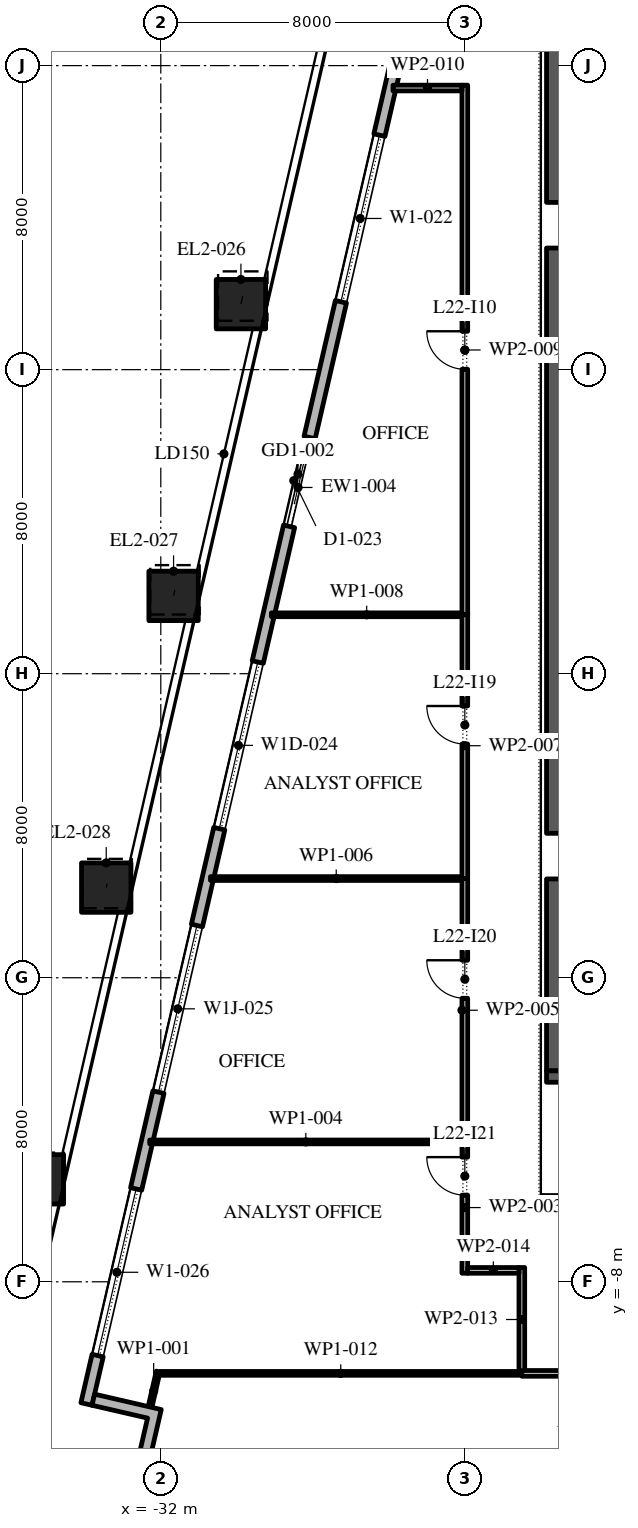
"""IFC4 building model, lengths in metres.
Left out: names, types, materials, properties, quantities, classifications, styles, units other than length and angle.
Written with IfcOpenShell. Run it as: python <this file> out.ifc"""

import sys

from ifc_helpers import new_model, si_unit, direction, frame, frame_2d, origin, origin_2d, place, context, subcontext, project, spatial, polyline, rectangle, outline, extrude, element, fill, save


model = new_model("IFC4")
c1 = context("Model", 3, precision=1e-05, world=origin(), true_north=direction((0.0, 1.0)))
c2 = subcontext(c1, "Body", "Model", "MODEL_VIEW")
j1 = project(units=[si_unit("LENGTHUNIT", "METRE"), si_unit("PLANEANGLEUNIT", "RADIAN")], contexts=[c1])
p1 = place(None, origin())
s1 = spatial("IfcSite", under=j1, at=p1, CompositionType="ELEMENT")
p2 = place(p1, origin())
s2 = spatial("IfcBuilding", under=s1, at=p2, CompositionType="ELEMENT")
p3 = place(p2, frame((0.0, 0.0, 105.6)))
s3 = spatial("IfcBuildingStorey", under=s2, at=p3, CompositionType="ELEMENT", Elevation=105.6)
p4 = place(p3, frame((-29.891, 17.723, 0.0), z_axis=(0.011668267153, 0.050562490995, 0.998652735462), x_axis=(-0.974391195695, 0.224859506699, 0.0)))
e1 = element("IfcColumn", 1, at=p4, inside=s3, PredefinedType="COLUMN", context=c2, shape_type="SweptSolid", body=[
    extrude(rectangle(XDim=1.3, YDim=1.3, at=origin_2d()), origin(), (0.0, 0.0, 1.0), 4.206),
])
p5 = place(p3, frame((-31.664, 10.047, 0.0), z_axis=(0.008770884695, 0.037929719907, 0.99924191662), x_axis=(-0.974290512438, 0.225295355862, 0.0)))
e2 = element("IfcColumn", 2, at=p5, inside=s3, PredefinedType="COLUMN", context=c2, shape_type="SweptSolid", body=[
    extrude(rectangle(XDim=1.3, YDim=1.3, at=origin_2d()), origin(), (0.0, 0.0, 1.0), 4.203),
])
p6 = place(p3, frame((-33.436, 2.371, 0.0), z_axis=(0.005869083212, 0.025335844359, 0.999661767226), x_axis=(-0.974202561131, 0.225675363932, 0.0)))
e3 = element("IfcColumn", 3, at=p6, inside=s3, PredefinedType="COLUMN", context=c2, shape_type="SweptSolid", body=[
    extrude(rectangle(XDim=1.3, YDim=1.3, at=origin_2d()), origin(), (0.0, 0.0, 1.0), 4.201),
])
p7 = place(p3, frame((-35.208, -5.305, 0.0), z_axis=(0.002906224189, 0.012671137464, 0.999915494498), x_axis=(-0.974691740237, 0.22355315143, 0.0)))
e4 = element("IfcColumn", 4, at=p7, inside=s3, PredefinedType="COLUMN", context=c2, shape_type="SweptSolid", body=[
    extrude(rectangle(XDim=1.3, YDim=1.3, at=origin_2d()), origin(), (0.0, 0.0, 1.0), 4.2),
])
p8 = place(p3, frame((-22.82, 37.016, 0.0), z_axis=(0.0, 0.0, 1.0), x_axis=(-0.224953880882, -0.974369412223, 0.0)))
e5 = element("IfcWall", 5, at=p8, inside=s3, PredefinedType="STANDARD", context=c2, shape_type="SweptSolid", body=[
    extrude(rectangle(XDim=49.5, YDim=0.3, at=frame_2d((24.75, 0.0))), origin(), (0.0, 0.0, 1.0), 4.0),
])
p9 = place(p8, frame((1.157, 0.0, 0.45)))
e6 = element("IfcOpeningElement", 6, at=p9, cuts=e5, PredefinedType="OPENING", context=c2, shape_type="SweptSolid", body=[
    extrude(rectangle(XDim=4.5, YDim=3.05, at=frame_2d((2.25, 1.525))), frame((0.0, 0.16, 0.0), z_axis=(0.0, -1.0, 0.0), x_axis=(1.0, 0.0, 0.0)), (0.0, 0.0, 1.0), 0.32),
])
p10 = place(p8, frame((8.121, 0.0, 0.45)))
e7 = element("IfcOpeningElement", 7, at=p10, cuts=e5, PredefinedType="OPENING", context=c2, shape_type="SweptSolid", body=[
    extrude(rectangle(XDim=4.5, YDim=3.05, at=frame_2d((2.25, 1.525))), frame((0.0, 0.16, 0.0), z_axis=(0.0, -1.0, 0.0), x_axis=(1.0, 0.0, 0.0)), (0.0, 0.0, 1.0), 0.32),
])
p11 = place(p8, frame((15.236, 0.0, 0.45)))
e8 = element("IfcOpeningElement", 8, at=p11, cuts=e5, PredefinedType="OPENING", context=c2, shape_type="SweptSolid", body=[
    extrude(rectangle(XDim=4.5, YDim=3.05, at=frame_2d((2.25, 1.525))), frame((0.0, 0.16, 0.0), z_axis=(0.0, -1.0, 0.0), x_axis=(1.0, 0.0, 0.0)), (0.0, 0.0, 1.0), 0.32),
])
p12 = place(p8, frame((23.4, 0.0, 0.0)))
e9 = element("IfcOpeningElement", 9, at=p12, cuts=e5, PredefinedType="OPENING", context=c2, shape_type="SweptSolid", body=[
    extrude(rectangle(XDim=2.4, YDim=3.5, at=frame_2d((1.2, 1.75))), frame((0.0, 0.16, 0.0), z_axis=(0.0, -1.0, 0.0), x_axis=(1.0, 0.0, 0.0)), (0.0, 0.0, 1.0), 0.32),
])
p13 = place(p8, frame((29.464, 0.0, 0.45)))
e10 = element("IfcOpeningElement", 10, at=p13, cuts=e5, PredefinedType="OPENING", context=c2, shape_type="SweptSolid", body=[
    extrude(rectangle(XDim=4.5, YDim=2.875, at=frame_2d((2.25, 1.438))), frame((0.0, 0.16, 0.0), z_axis=(0.0, -1.0, 0.0), x_axis=(1.0, 0.0, 0.0)), (0.0, 0.0, 1.0), 0.32),
])
p14 = place(p8, frame((36.579, 0.0, 0.45)))
e11 = element("IfcOpeningElement", 11, at=p14, cuts=e5, PredefinedType="OPENING", context=c2, shape_type="SweptSolid", body=[
    extrude(rectangle(XDim=4.5, YDim=2.675, at=frame_2d((2.25, 1.337))), frame((0.0, 0.16, 0.0), z_axis=(0.0, -1.0, 0.0), x_axis=(1.0, 0.0, 0.0)), (0.0, 0.0, 1.0), 0.32),
])
p15 = place(p8, frame((43.693, 0.0, 0.45)))
e12 = element("IfcOpeningElement", 12, at=p15, cuts=e5, PredefinedType="OPENING", context=c2, shape_type="SweptSolid", body=[
    extrude(rectangle(XDim=4.5, YDim=3.05, at=frame_2d((2.25, 1.525))), frame((0.0, 0.16, 0.0), z_axis=(0.0, -1.0, 0.0), x_axis=(1.0, 0.0, 0.0)), (0.0, 0.0, 1.0), 0.32),
])
p16 = place(p3, origin())
e13 = element("IfcWall", 13, at=p16, inside=s3, PredefinedType="STANDARD", context=c2, shape_type="SweptSolid", body=[
    extrude(outline(polyline([(-32.393, -13.116), (-30.639, -13.521), (-31.111, -15.567), (-31.404, -15.5), (-30.999, -13.746), (-32.753, -13.341), (-32.348, -11.587), (-33.809, -11.25), (-33.742, -10.957), (-31.988, -11.362), (-32.393, -13.116)])), origin(), (0.0, 0.0, 1.0), 4.0),
])
p17 = place(p3, frame((-21.425, -2.45, 0.0), z_axis=(0.0, 0.0, 1.0), x_axis=(0.0, 1.0, 0.0)))
e14 = element("IfcWall", 14, at=p17, inside=s3, PredefinedType="SHEAR", context=c2, shape_type="SweptSolid", body=[
    extrude(rectangle(XDim=27.9, YDim=0.85, at=frame_2d((13.95, 0.0))), origin(), (0.0, 0.0, 1.0), 4.0),
])
p18 = place(p17, frame((5.05, 0.0, 0.0)))
e15 = element("IfcOpeningElement", 15, at=p18, cuts=e14, PredefinedType="OPENING", context=c2, shape_type="SweptSolid", body=[
    extrude(rectangle(XDim=1.2, YDim=2.1, at=frame_2d((0.6, 1.05))), frame((0.0, 0.435, 0.0), z_axis=(0.0, -1.0, 0.0), x_axis=(1.0, 0.0, 0.0)), (0.0, 0.0, 1.0), 0.87),
])
p19 = place(p17, frame((21.65, 0.0, 0.0)))
e16 = element("IfcOpeningElement", 16, at=p19, cuts=e14, PredefinedType="OPENING", context=c2, shape_type="SweptSolid", body=[
    extrude(rectangle(XDim=1.2, YDim=2.1, at=frame_2d((0.6, 1.05))), frame((0.0, 0.435, 0.0), z_axis=(0.0, -1.0, 0.0), x_axis=(1.0, 0.0, 0.0)), (0.0, 0.0, 1.0), 0.87),
])
p20 = place(p3, frame((-21.85, -2.6, 0.0), z_axis=(0.0, 0.0, 1.0), x_axis=(1.0, 0.0, 0.0)))
e17 = element("IfcWall", 17, at=p20, inside=s3, PredefinedType="SHEAR", context=c2, shape_type="SweptSolid", body=[
    extrude(rectangle(XDim=11.7, YDim=0.3, at=frame_2d((5.85, 0.0))), origin(), (0.0, 0.0, 1.0), 4.0),
])
p21 = place(p3, frame((-32.069, -10.361, 0.0), z_axis=(0.0, 0.0, 1.0), x_axis=(-0.222987762652, -0.974821243976, 0.0)))
e18 = element("IfcWall", 18, at=p21, inside=s3, PredefinedType="PARTITIONING", context=c2, shape_type="SweptSolid", body=[
    extrude(rectangle(XDim=1.058, YDim=0.1, at=frame_2d((0.529, 0.0))), origin(), (0.0, 0.0, 1.0), 4.0),
])
p22 = place(p3, frame((-24.0, -7.775, 0.0), z_axis=(0.0, 0.0, 1.0), x_axis=(0.0, 1.0, 0.0)))
e19 = element("IfcWall", 19, at=p22, inside=s3, PredefinedType="PARTITIONING", context=c2, shape_type="SweptSolid", body=[
    extrude(rectangle(XDim=3.455, YDim=0.15, at=frame_2d((1.728, 0.0))), origin(), (0.0, 0.0, 1.0), 4.0),
])
p23 = place(p22, frame((2.055, 0.0, 0.0)))
e20 = element("IfcOpeningElement", 20, at=p23, cuts=e19, PredefinedType="OPENING", context=c2, shape_type="SweptSolid", body=[
    extrude(rectangle(XDim=1.0, YDim=2.1, at=frame_2d((0.5, 1.05))), frame((0.0, 0.085, 0.0), z_axis=(0.0, -1.0, 0.0), x_axis=(1.0, 0.0, 0.0)), (0.0, 0.0, 1.0), 0.17),
])
p24 = place(p3, frame((-24.075, -4.32, 0.0), z_axis=(0.0, 0.0, 1.0), x_axis=(-1.0, 0.0, 0.0)))
e21 = element("IfcWall", 21, at=p24, inside=s3, PredefinedType="PARTITIONING", context=c2, shape_type="SweptSolid", body=[
    extrude(rectangle(XDim=8.217, YDim=0.1, at=frame_2d((4.108, 0.0))), origin(), (0.0, 0.0, 1.0), 4.0),
])
p25 = place(p3, frame((-24.0, -4.32, 0.0), z_axis=(0.0, 0.0, 1.0), x_axis=(0.0, 1.0, 0.0)))
e22 = element("IfcWall", 22, at=p25, inside=s3, PredefinedType="PARTITIONING", context=c2, shape_type="SweptSolid", body=[
    extrude(rectangle(XDim=6.93, YDim=0.15, at=frame_2d((3.465, 0.0))), origin(), (0.0, 0.0, 1.0), 4.0),
])
p26 = place(p25, frame((3.78, 0.0, 0.0)))
e23 = element("IfcOpeningElement", 23, at=p26, cuts=e22, PredefinedType="OPENING", context=c2, shape_type="SweptSolid", body=[
    extrude(rectangle(XDim=1.0, YDim=2.1, at=frame_2d((0.5, 1.05))), frame((0.0, 0.085, 0.0), z_axis=(0.0, -1.0, 0.0), x_axis=(1.0, 0.0, 0.0)), (0.0, 0.0, 1.0), 0.17),
])
p27 = place(p3, frame((-24.075, 2.61, 0.0), z_axis=(0.0, 0.0, 1.0), x_axis=(-1.0, 0.0, 0.0)))
e24 = element("IfcWall", 24, at=p27, inside=s3, PredefinedType="PARTITIONING", context=c2, shape_type="SweptSolid", body=[
    extrude(rectangle(XDim=6.617, YDim=0.1, at=frame_2d((3.309, 0.0))), origin(), (0.0, 0.0, 1.0), 4.0),
])
p28 = place(p3, frame((-24.0, 2.61, 0.0), z_axis=(0.0, 0.0, 1.0), x_axis=(0.0, 1.0, 0.0)))
e25 = element("IfcWall", 25, at=p28, inside=s3, PredefinedType="PARTITIONING", context=c2, shape_type="SweptSolid", body=[
    extrude(rectangle(XDim=6.99, YDim=0.15, at=frame_2d((3.495, 0.0))), origin(), (0.0, 0.0, 1.0), 4.0),
])
p29 = place(p28, frame((3.54, 0.0, 0.0)))
e26 = element("IfcOpeningElement", 26, at=p29, cuts=e25, PredefinedType="OPENING", context=c2, shape_type="SweptSolid", body=[
    extrude(rectangle(XDim=1.0, YDim=2.1, at=frame_2d((0.5, 1.05))), frame((0.0, 0.085, 0.0), z_axis=(0.0, -1.0, 0.0), x_axis=(1.0, 0.0, 0.0)), (0.0, 0.0, 1.0), 0.17),
])
p30 = place(p3, frame((-24.075, 9.55, 0.0), z_axis=(0.0, 0.0, 1.0), x_axis=(-1.0, 0.0, 0.0)))
e27 = element("IfcWall", 27, at=p30, inside=s3, PredefinedType="PARTITIONING", context=c2, shape_type="SweptSolid", body=[
    extrude(rectangle(XDim=5.015, YDim=0.1, at=frame_2d((2.508, 0.0))), origin(), (0.0, 0.0, 1.0), 4.0),
])
p31 = place(p3, frame((-24.0, 9.55, 0.0), z_axis=(0.0, 0.0, 1.0), x_axis=(0.0, 1.0, 0.0)))
e28 = element("IfcWall", 28, at=p31, inside=s3, PredefinedType="PARTITIONING", context=c2, shape_type="SweptSolid", body=[
    extrude(rectangle(XDim=13.935, YDim=0.15, at=frame_2d((6.968, 0.0))), origin(), (0.0, 0.0, 1.0), 4.0),
])
p32 = place(p31, frame((6.46, 0.0, 0.0)))
e29 = element("IfcOpeningElement", 29, at=p32, cuts=e28, PredefinedType="OPENING", context=c2, shape_type="SweptSolid", body=[
    extrude(rectangle(XDim=1.0, YDim=2.1, at=frame_2d((0.5, 1.05))), frame((0.0, 0.085, 0.0), z_axis=(0.0, -1.0, 0.0), x_axis=(1.0, 0.0, 0.0)), (0.0, 0.0, 1.0), 0.17),
])
p33 = place(p3, frame((-24.075, 23.41, 0.0), z_axis=(0.0, 0.0, 1.0), x_axis=(-1.0, 0.0, 0.0)))
e30 = element("IfcWall", 30, at=p33, inside=s3, PredefinedType="PARTITIONING", context=c2, shape_type="SweptSolid", body=[
    extrude(rectangle(XDim=1.815, YDim=0.15, at=frame_2d((0.907, 0.0))), origin(), (0.0, 0.0, 1.0), 4.0),
])
p34 = place(p3, frame((-22.5, -10.41, 0.0), z_axis=(0.0, 0.0, 1.0), x_axis=(-1.0, 0.0, 0.0)))
e31 = element("IfcWall", 31, at=p34, inside=s3, PredefinedType="PARTITIONING", context=c2, shape_type="SweptSolid", body=[
    extrude(rectangle(XDim=9.53, YDim=0.1, at=frame_2d((4.765, 0.0))), origin(), (0.0, 0.0, 1.0), 4.0),
])
p35 = place(p3, frame((-22.5, -10.36, 0.0), z_axis=(0.0, 0.0, 1.0), x_axis=(0.0, 1.0, 0.0)))
e32 = element("IfcWall", 32, at=p35, inside=s3, PredefinedType="PARTITIONING", context=c2, shape_type="SweptSolid", body=[
    extrude(rectangle(XDim=2.735, YDim=0.15, at=frame_2d((1.368, 0.0))), origin(), (0.0, 0.0, 1.0), 4.0),
])
p36 = place(p3, frame((-22.575, -7.7, 0.0), z_axis=(0.0, 0.0, 1.0), x_axis=(-1.0, 0.0, 0.0)))
e33 = element("IfcWall", 33, at=p36, inside=s3, PredefinedType="PARTITIONING", context=c2, shape_type="SweptSolid", body=[
    extrude(rectangle(XDim=1.35, YDim=0.15, at=frame_2d((0.675, 0.0))), origin(), (0.0, 0.0, 1.0), 4.0),
])
p37 = place(p3, frame((-18.7, -10.41, 0.0), z_axis=(0.0, 0.0, 1.0), x_axis=(-1.0, 0.0, 0.0)))
e34 = element("IfcWall", 34, at=p37, inside=s3, PredefinedType="PARTITIONING", context=c2, shape_type="SweptSolid", body=[
    extrude(rectangle(XDim=3.8, YDim=0.15, at=frame_2d((1.9, 0.0))), origin(), (0.0, 0.0, 1.0), 4.0),
])
p38 = place(p37, frame((1.4, 0.0, 0.0)))
e35 = element("IfcOpeningElement", 35, at=p38, cuts=e34, PredefinedType="OPENING", context=c2, shape_type="SweptSolid", body=[
    extrude(rectangle(XDim=1.0, YDim=2.1, at=frame_2d((0.5, 1.05))), frame((0.0, 0.085, 0.0), z_axis=(0.0, -1.0, 0.0), x_axis=(1.0, 0.0, 0.0)), (0.0, 0.0, 1.0), 0.17),
])
p39 = place(p11, origin())
e36 = element("IfcWindow", 36, at=p39, inside=s3, PartitioningType="DOUBLE_PANEL_VERTICAL", PredefinedType="WINDOW", context=c2, shape_type="SweptSolid", body=[
    extrude(rectangle(XDim=4.5, YDim=3.05, at=frame_2d((2.25, 1.525))), frame((0.0, 0.03, 0.0), z_axis=(0.0, -1.0, 0.0), x_axis=(1.0, 0.0, 0.0)), (0.0, 0.0, 1.0), 0.06),
])
fill(e8, e36)
p40 = place(p12, origin())
e37 = element("IfcDoor", 37, at=p40, inside=s3, OperationType="DOUBLE_DOOR_SLIDING", PredefinedType="DOOR", context=c2, shape_type="SweptSolid", body=[
    extrude(rectangle(XDim=2.4, YDim=3.5, at=frame_2d((1.2, 1.75))), frame((0.0, 0.025, 0.0), z_axis=(0.0, -1.0, 0.0), x_axis=(1.0, 0.0, 0.0)), (0.0, 0.0, 1.0), 0.05),
])
fill(e9, e37)
p41 = place(p13, origin())
e38 = element("IfcWindow", 38, at=p41, inside=s3, PartitioningType="DOUBLE_PANEL_VERTICAL", PredefinedType="WINDOW", context=c2, shape_type="SweptSolid", body=[
    extrude(rectangle(XDim=4.5, YDim=2.875, at=frame_2d((2.25, 1.438))), frame((0.0, 0.03, 0.0), z_axis=(0.0, -1.0, 0.0), x_axis=(1.0, 0.0, 0.0)), (0.0, 0.0, 1.0), 0.06),
])
fill(e10, e38)
p42 = place(p14, origin())
e39 = element("IfcWindow", 39, at=p42, inside=s3, PartitioningType="DOUBLE_PANEL_VERTICAL", PredefinedType="WINDOW", context=c2, shape_type="SweptSolid", body=[
    extrude(rectangle(XDim=4.5, YDim=2.675, at=frame_2d((2.25, 1.337))), frame((0.0, 0.03, 0.0), z_axis=(0.0, -1.0, 0.0), x_axis=(1.0, 0.0, 0.0)), (0.0, 0.0, 1.0), 0.06),
])
fill(e11, e39)
p43 = place(p15, origin())
e40 = element("IfcWindow", 40, at=p43, inside=s3, PartitioningType="DOUBLE_PANEL_VERTICAL", PredefinedType="WINDOW", context=c2, shape_type="SweptSolid", body=[
    extrude(rectangle(XDim=4.5, YDim=3.05, at=frame_2d((2.25, 1.525))), frame((0.0, 0.03, 0.0), z_axis=(0.0, -1.0, 0.0), x_axis=(1.0, 0.0, 0.0)), (0.0, 0.0, 1.0), 0.06),
])
fill(e12, e40)
p44 = place(p32, origin())
e41 = element("IfcDoor", 41, at=p44, inside=s3, OperationType="SINGLE_SWING_LEFT", PredefinedType="DOOR", context=c2, shape_type="SweptSolid", body=[
    extrude(rectangle(XDim=1.0, YDim=2.1, at=frame_2d((0.5, 1.05))), frame((0.0, 0.025, 0.0), z_axis=(0.0, -1.0, 0.0), x_axis=(1.0, 0.0, 0.0)), (0.0, 0.0, 1.0), 0.05),
])
fill(e29, e41)
p45 = place(p29, origin())
e42 = element("IfcDoor", 42, at=p45, inside=s3, OperationType="SINGLE_SWING_LEFT", PredefinedType="DOOR", context=c2, shape_type="SweptSolid", body=[
    extrude(rectangle(XDim=1.0, YDim=2.1, at=frame_2d((0.5, 1.05))), frame((0.0, 0.025, 0.0), z_axis=(0.0, -1.0, 0.0), x_axis=(1.0, 0.0, 0.0)), (0.0, 0.0, 1.0), 0.05),
])
fill(e26, e42)
p46 = place(p26, origin())
e43 = element("IfcDoor", 43, at=p46, inside=s3, OperationType="SINGLE_SWING_LEFT", PredefinedType="DOOR", context=c2, shape_type="SweptSolid", body=[
    extrude(rectangle(XDim=1.0, YDim=2.1, at=frame_2d((0.5, 1.05))), frame((0.0, 0.025, 0.0), z_axis=(0.0, -1.0, 0.0), x_axis=(1.0, 0.0, 0.0)), (0.0, 0.0, 1.0), 0.05),
])
fill(e23, e43)
p47 = place(p23, origin())
e44 = element("IfcDoor", 44, at=p47, inside=s3, OperationType="SINGLE_SWING_LEFT", PredefinedType="DOOR", context=c2, shape_type="SweptSolid", body=[
    extrude(rectangle(XDim=1.0, YDim=2.1, at=frame_2d((0.5, 1.05))), frame((0.0, 0.025, 0.0), z_axis=(0.0, -1.0, 0.0), x_axis=(1.0, 0.0, 0.0)), (0.0, 0.0, 1.0), 0.05),
])
fill(e20, e44)
save(model, sys.argv[1])
